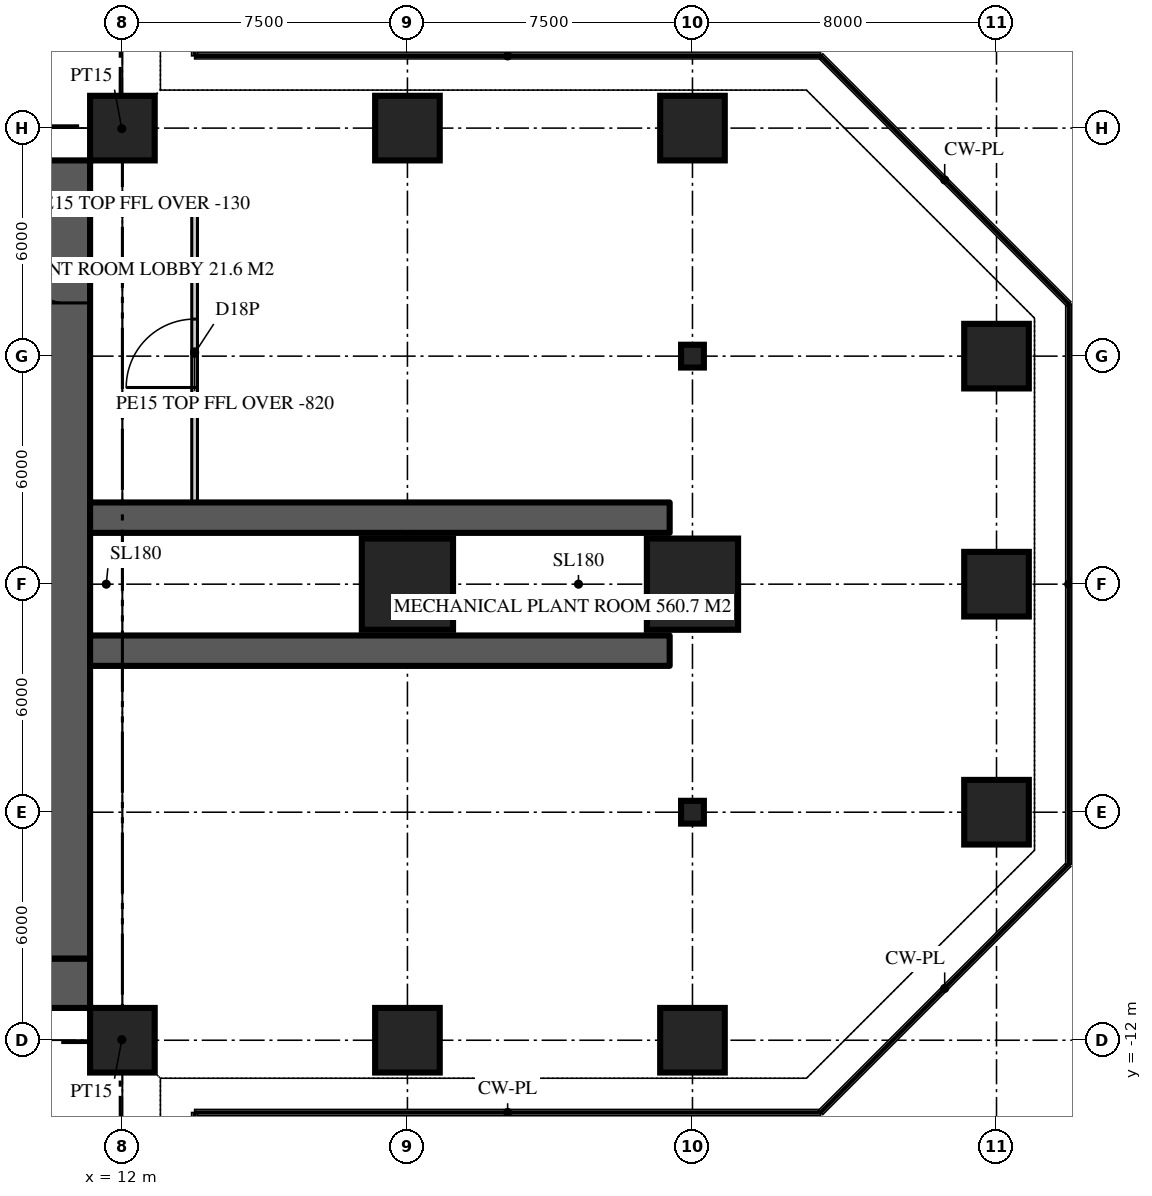
"""IFC4 building model, lengths in metres.
Left out: names, types, materials, properties, quantities, classifications, styles, units other than length and angle.
Written with IfcOpenShell. Run it as: python <this file> out.ifc"""

import sys

from ifc_helpers import new_model, si_unit, direction, frame, frame_2d, origin, origin_2d, place, context, subcontext, project, spatial, rectangle, hollow_rectangle, extrude, element, fill, save


model = new_model("IFC4")
c1 = context("Model", 3, precision=1e-05, world=origin(), true_north=direction((0.0, 1.0)))
c2 = subcontext(c1, "Body", "Model", "MODEL_VIEW")
j1 = project(units=[si_unit("LENGTHUNIT", "METRE"), si_unit("PLANEANGLEUNIT", "RADIAN")], contexts=[c1])
p1 = place(None, origin())
s1 = spatial("IfcSite", under=j1, at=p1, CompositionType="ELEMENT")
p2 = place(p1, origin())
s2 = spatial("IfcBuilding", under=s1, at=p2, CompositionType="ELEMENT")
p3 = place(p2, frame((0.0, 0.0, 198.9)))
s3 = spatial("IfcBuildingStorey", under=s2, at=p3, CompositionType="ELEMENT", Elevation=198.9)
p4 = place(p3, frame((-11.15, 10.5, 0.0), z_axis=(0.0, 0.0, 1.0), x_axis=(1.0, 0.0, 0.0)))
e1 = element("IfcWall", 1, at=p4, inside=s3, PredefinedType="SHEAR", context=c2, shape_type="SweptSolid", body=[
    extrude(rectangle(XDim=22.3, YDim=1.3, at=frame_2d((11.15, 0.0))), origin(), (0.0, 0.0, 1.0), 6.0),
])
p5 = place(p4, frame((4.25, 0.0, 0.0)))
e2 = element("IfcOpeningElement", 2, at=p5, cuts=e1, PredefinedType="OPENING", context=c2, shape_type="SweptSolid", body=[
    extrude(rectangle(XDim=1.8, YDim=2.2, at=frame_2d((0.9, 1.1))), frame((0.0, 0.66, 0.0), z_axis=(0.0, -1.0, 0.0), x_axis=(1.0, 0.0, 0.0)), (0.0, 0.0, 1.0), 1.32),
])
p6 = place(p4, frame((16.25, 0.0, 0.0)))
e3 = element("IfcOpeningElement", 3, at=p6, cuts=e1, PredefinedType="OPENING", context=c2, shape_type="SweptSolid", body=[
    extrude(rectangle(XDim=1.8, YDim=2.2, at=frame_2d((0.9, 1.1))), frame((0.0, 0.66, 0.0), z_axis=(0.0, -1.0, 0.0), x_axis=(1.0, 0.0, 0.0)), (0.0, 0.0, 1.0), 1.32),
])
p7 = place(p3, frame((11.15, -10.5, 0.0), z_axis=(0.0, 0.0, 1.0), x_axis=(-1.0, 0.0, 0.0)))
e4 = element("IfcWall", 4, at=p7, inside=s3, PredefinedType="SHEAR", context=c2, shape_type="SweptSolid", body=[
    extrude(rectangle(XDim=22.3, YDim=1.3, at=frame_2d((11.15, 0.0))), origin(), (0.0, 0.0, 1.0), 6.0),
])
p8 = place(p7, frame((16.25, 0.0, 0.0)))
e5 = element("IfcOpeningElement", 5, at=p8, cuts=e4, PredefinedType="OPENING", context=c2, shape_type="SweptSolid", body=[
    extrude(rectangle(XDim=1.8, YDim=2.2, at=frame_2d((0.9, 1.1))), frame((0.0, 0.66, 0.0), z_axis=(0.0, -1.0, 0.0), x_axis=(1.0, 0.0, 0.0)), (0.0, 0.0, 1.0), 1.32),
])
p9 = place(p7, frame((4.25, 0.0, 0.0)))
e6 = element("IfcOpeningElement", 6, at=p9, cuts=e4, PredefinedType="OPENING", context=c2, shape_type="SweptSolid", body=[
    extrude(rectangle(XDim=1.8, YDim=2.2, at=frame_2d((0.9, 1.1))), frame((0.0, 0.66, 0.0), z_axis=(0.0, -1.0, 0.0), x_axis=(1.0, 0.0, 0.0)), (0.0, 0.0, 1.0), 1.32),
])
p10 = place(p3, frame((10.5, -9.85, 0.0), z_axis=(0.0, 0.0, 1.0), x_axis=(0.0, 1.0, 0.0)))
e7 = element("IfcWall", 7, at=p10, inside=s3, PredefinedType="SHEAR", context=c2, shape_type="SweptSolid", body=[
    extrude(rectangle(XDim=19.7, YDim=1.3, at=frame_2d((9.85, 0.0))), origin(), (0.0, 0.0, 1.0), 6.0),
])
p11 = place(p10, frame((17.25, 0.0, 0.0)))
e8 = element("IfcOpeningElement", 8, at=p11, cuts=e7, PredefinedType="OPENING", context=c2, shape_type="SweptSolid", body=[
    extrude(rectangle(XDim=1.0, YDim=2.2, at=frame_2d((0.5, 1.1))), frame((0.0, 0.66, 0.0), z_axis=(0.0, -1.0, 0.0), x_axis=(1.0, 0.0, 0.0)), (0.0, 0.0, 1.0), 1.32),
])
for number, where, z_axis, x_axis in (
    (9, (11.15, -1.75, 0.0), (0.0, 0.0, 1.0), (1.0, 0.0, 0.0)),
    (10, (11.15, 1.75, 0.0), (0.0, 0.0, 1.0), (1.0, 0.0, 0.0)),
):
    element("IfcWall", number, at=place(p3, frame(where, z_axis=z_axis, x_axis=x_axis)), inside=s3, PredefinedType="SHEAR", context=c2, shape_type="SweptSolid", body=[
        extrude(rectangle(XDim=15.25, YDim=0.8, at=frame_2d((7.625, 0.0))), origin(), (0.0, 0.0, 1.0), 6.0),
    ])
for number, where, z_axis, x_axis in (
    (11, (12.0, -12.0, 0.0), (0.0, 0.0, 1.0), (1.0, 0.0, 0.0)),
    (12, (19.5, -12.0, 0.0), (0.0, 0.0, 1.0), (1.0, 0.0, 0.0)),
    (13, (27.0, -12.0, 0.0), (0.0, 0.0, 1.0), (1.0, 0.0, 0.0)),
    (14, (35.0, -6.0, 0.0), (0.0, 0.0, 1.0), (1.0, 0.0, 0.0)),
):
    element("IfcColumn", number, at=place(p3, frame(where, z_axis=z_axis, x_axis=x_axis)), inside=s3, PredefinedType="COLUMN", context=c2, shape_type="SweptSolid", body=[
        extrude(rectangle(XDim=1.7, YDim=1.7, at=origin_2d()), origin(), (0.0, 0.0, 1.0), 6.0),
    ])
for number, where, z_axis, x_axis in (
    (15, (19.5, 0.0, 0.0), (0.0, 0.0, 1.0), (1.0, 0.0, 0.0)),
    (16, (27.0, 0.0, 0.0), (0.0, 0.0, 1.0), (1.0, 0.0, 0.0)),
):
    element("IfcColumn", number, at=place(p3, frame(where, z_axis=z_axis, x_axis=x_axis)), inside=s3, PredefinedType="COLUMN", context=c2, shape_type="SweptSolid", body=[
        extrude(rectangle(XDim=2.4, YDim=2.4, at=origin_2d()), origin(), (0.0, 0.0, 1.0), 6.0),
    ])
for number, where, z_axis, x_axis in (
    (17, (35.0, 0.0, 0.0), (0.0, 0.0, 1.0), (1.0, 0.0, 0.0)),
    (18, (35.0, 6.0, 0.0), (0.0, 0.0, 1.0), (1.0, 0.0, 0.0)),
    (19, (12.0, 12.0, 0.0), (0.0, 0.0, 1.0), (1.0, 0.0, 0.0)),
    (20, (19.5, 12.0, 0.0), (0.0, 0.0, 1.0), (1.0, 0.0, 0.0)),
    (21, (27.0, 12.0, 0.0), (0.0, 0.0, 1.0), (1.0, 0.0, 0.0)),
):
    element("IfcColumn", number, at=place(p3, frame(where, z_axis=z_axis, x_axis=x_axis)), inside=s3, PredefinedType="COLUMN", context=c2, shape_type="SweptSolid", body=[
        extrude(rectangle(XDim=1.7, YDim=1.7, at=origin_2d()), origin(), (0.0, 0.0, 1.0), 6.0),
    ])
for number, where, z_axis, x_axis in (
    (22, (27.0, -6.0, -0.18), (0.0, 0.0, 1.0), (1.0, 0.0, 0.0)),
    (23, (27.0, 6.0, -0.18), (0.0, 0.0, 1.0), (1.0, 0.0, 0.0)),
):
    element("IfcColumn", number, at=place(p3, frame(where, z_axis=z_axis, x_axis=x_axis)), inside=s3, PredefinedType="COLUMN", context=c2, shape_type="SweptSolid", body=[
        extrude(hollow_rectangle(XDim=1.0, YDim=1.0, WallThickness=0.06, at=origin_2d()), origin(), (0.0, 0.0, 1.0), 5.05),
    ])
p12 = place(p3, frame((13.9, 2.15, 0.0), z_axis=(0.0, 0.0, 1.0), x_axis=(0.0, 1.0, 0.0)))
e24 = element("IfcWall", 24, at=p12, inside=s3, PredefinedType="SOLIDWALL", context=c2, shape_type="SweptSolid", body=[
    extrude(rectangle(XDim=7.925, YDim=0.15, at=frame_2d((3.962, 0.0))), origin(), (0.0, 0.0, 1.0), 5.18),
])
p13 = place(p12, frame((3.025, 0.0, 0.0)))
e25 = element("IfcOpeningElement", 25, at=p13, cuts=e24, PredefinedType="OPENING", context=c2, shape_type="SweptSolid", body=[
    extrude(rectangle(XDim=1.8, YDim=2.4, at=frame_2d((0.9, 1.2))), frame((0.0, 0.085, 0.0), z_axis=(0.0, -1.0, 0.0), x_axis=(1.0, 0.0, 0.0)), (0.0, 0.0, 1.0), 0.17),
])
p14 = place(p3, frame((11.15, 10.0, 0.0), z_axis=(0.0, 0.0, 1.0), x_axis=(1.0, 0.0, 0.0)))
e26 = element("IfcWall", 26, at=p14, inside=s3, PredefinedType="SOLIDWALL", context=c2, shape_type="SweptSolid", body=[
    extrude(rectangle(XDim=2.675, YDim=0.15, at=frame_2d((1.337, 0.0))), origin(), (0.0, 0.0, 1.0), 5.87),
])
for number, where, z_axis, x_axis in (
    (27, (11.15, 11.15, 0.0), (0.0, 0.0, 1.0), (0.707, 0.707, 0.0)),
    (28, (11.15, -11.15, 0.0), (0.0, 0.0, 1.0), (0.707, -0.707, 0.0)),
):
    element("IfcWall", number, at=place(p3, frame(where, z_axis=z_axis, x_axis=x_axis)), inside=s3, PredefinedType="PARTITIONING", context=c2, shape_type="SweptSolid", body=[
        extrude(rectangle(XDim=2.362, YDim=0.15, at=frame_2d((1.181, 0.0))), origin(), (0.0, 0.0, 1.0), 5.32),
    ])
p15 = place(p11, origin())
e29 = element("IfcDoor", 29, at=p15, inside=s3, OperationType="SINGLE_SWING_RIGHT", PredefinedType="DOOR", context=c2, shape_type="SweptSolid", body=[
    extrude(rectangle(XDim=1.0, YDim=2.2, at=frame_2d((0.5, 1.1))), frame((0.0, 0.025, 0.0), z_axis=(0.0, -1.0, 0.0), x_axis=(1.0, 0.0, 0.0)), (0.0, 0.0, 1.0), 0.05),
])
fill(e8, e29)
p16 = place(p13, origin())
e30 = element("IfcDoor", 30, at=p16, inside=s3, OperationType="DOUBLE_DOOR_DOUBLE_SWING", PredefinedType="DOOR", context=c2, shape_type="SweptSolid", body=[
    extrude(rectangle(XDim=1.8, YDim=2.4, at=frame_2d((0.9, 1.2))), frame((0.0, 0.025, 0.0), z_axis=(0.0, -1.0, 0.0), x_axis=(1.0, 0.0, 0.0)), (0.0, 0.0, 1.0), 0.05),
])
fill(e25, e30)
save(model, sys.argv[1])
